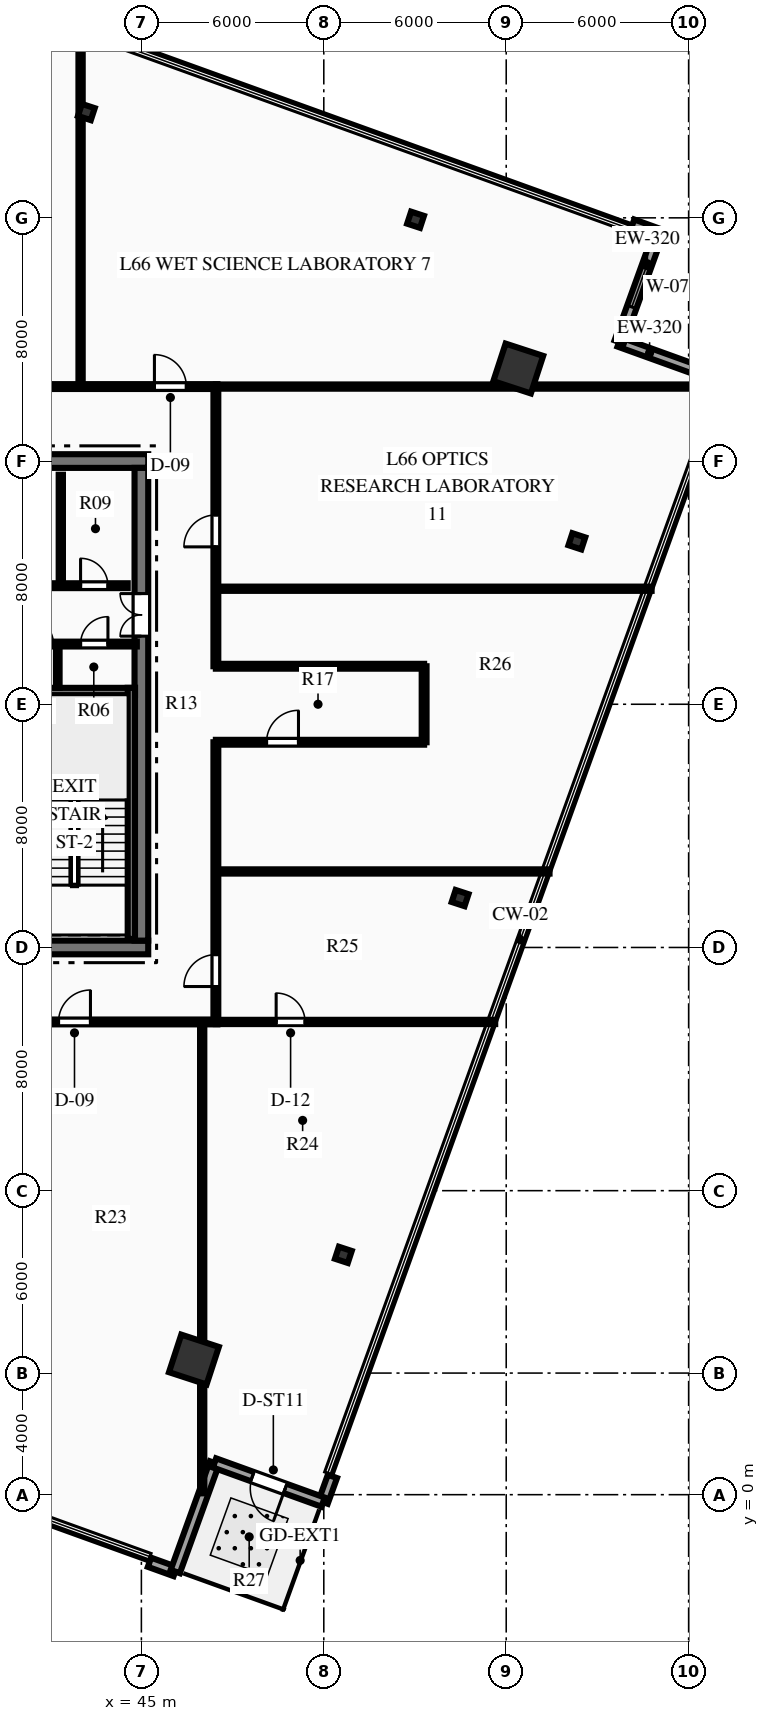
"""IFC4 building model, lengths in metres.
Left out: names, types, materials, properties, quantities, classifications, styles, units other than length and angle.
Written with IfcOpenShell. Run it as: python <this file> out.ifc"""

import sys

from ifc_helpers import new_model, si_unit, direction, frame, frame_2d, origin, origin_2d, place, context, subcontext, project, spatial, rectangle, hollow_rectangle, i_section, extrude, element, fill, save


model = new_model("IFC4")
c1 = context("Model", 3, precision=1e-05, world=origin(), true_north=direction((0.0, 1.0)))
c2 = subcontext(c1, "Body", "Model", "MODEL_VIEW")
j1 = project(units=[si_unit("LENGTHUNIT", "METRE"), si_unit("PLANEANGLEUNIT", "RADIAN")], contexts=[c1])
p1 = place(None, origin())
s1 = spatial("IfcSite", under=j1, at=p1, CompositionType="ELEMENT")
p2 = place(p1, origin())
s2 = spatial("IfcBuilding", under=s1, at=p2, CompositionType="ELEMENT")
p3 = place(p2, frame((0.0, 0.0, 263.7)))
s3 = spatial("IfcBuildingStorey", under=s2, at=p3, CompositionType="ELEMENT", Elevation=263.7)
p4 = place(p3, frame((26.775, 18.0, 0.0), z_axis=(0.0, 0.0, 1.0), x_axis=(1.0, 0.0, 0.0)))
e1 = element("IfcWall", 1, at=p4, inside=s3, PredefinedType="SHEAR", context=c2, shape_type="SweptSolid", body=[
    extrude(rectangle(XDim=18.45, YDim=0.45, at=frame_2d((9.225, 0.0))), origin(), (0.0, 0.0, 1.0), 3.75),
])
p5 = place(p4, frame((7.325, 0.0, 0.0)))
e2 = element("IfcOpeningElement", 2, at=p5, cuts=e1, PredefinedType="OPENING", context=c2, shape_type="SweptSolid", body=[
    extrude(rectangle(XDim=1.1, YDim=2.15, at=frame_2d((0.55, 1.075))), frame((0.0, 0.235, 0.0), z_axis=(0.0, -1.0, 0.0), x_axis=(1.0, 0.0, 0.0)), (0.0, 0.0, 1.0), 0.47),
])
p6 = place(p4, frame((10.025, 0.0, 0.0)))
e3 = element("IfcOpeningElement", 3, at=p6, cuts=e1, PredefinedType="OPENING", context=c2, shape_type="SweptSolid", body=[
    extrude(rectangle(XDim=1.1, YDim=2.15, at=frame_2d((0.55, 1.075))), frame((0.0, 0.235, 0.0), z_axis=(0.0, -1.0, 0.0), x_axis=(1.0, 0.0, 0.0)), (0.0, 0.0, 1.0), 0.47),
])
p7 = place(p3, frame((26.775, 34.0, 0.0), z_axis=(0.0, 0.0, 1.0), x_axis=(1.0, 0.0, 0.0)))
e4 = element("IfcWall", 4, at=p7, inside=s3, PredefinedType="SHEAR", context=c2, shape_type="SweptSolid", body=[
    extrude(rectangle(XDim=18.45, YDim=0.45, at=frame_2d((9.225, 0.0))), origin(), (0.0, 0.0, 1.0), 3.75),
])
p8 = place(p3, frame((45.0, 18.225, 0.0), z_axis=(0.0, 0.0, 1.0), x_axis=(0.0, 1.0, 0.0)))
e5 = element("IfcWall", 5, at=p8, inside=s3, PredefinedType="SHEAR", context=c2, shape_type="SweptSolid", body=[
    extrude(rectangle(XDim=15.55, YDim=0.45, at=frame_2d((7.775, 0.0))), origin(), (0.0, 0.0, 1.0), 3.75),
])
p9 = place(p8, frame((10.015, 0.0, 0.0)))
e6 = element("IfcOpeningElement", 6, at=p9, cuts=e5, PredefinedType="OPENING", context=c2, shape_type="SweptSolid", body=[
    extrude(rectangle(XDim=1.4, YDim=2.2, at=frame_2d((0.7, 1.1))), frame((0.0, 0.235, 0.0), z_axis=(0.0, -1.0, 0.0), x_axis=(1.0, 0.0, 0.0)), (0.0, 0.0, 1.0), 0.47),
])
p10 = place(p3, frame((40.81, 26.42, 0.0), z_axis=(0.0, 0.0, 1.0), x_axis=(1.0, 0.0, 0.0)))
e7 = element("IfcWall", 7, at=p10, inside=s3, PredefinedType="SHEAR", context=c2, shape_type="SweptSolid", body=[
    extrude(rectangle(XDim=3.98, YDim=0.24, at=frame_2d((1.99, 0.0))), origin(), (0.0, 0.0, 1.0), 3.75),
])
p11 = place(p3, frame((44.67, 18.28, 0.0), z_axis=(0.0, 0.0, 1.0), x_axis=(0.0, 1.0, 0.0)))
e8 = element("IfcWall", 8, at=p11, inside=s3, PredefinedType="SHEAR", context=c2, shape_type="SweptSolid", body=[
    extrude(rectangle(XDim=8.26, YDim=0.24, at=frame_2d((4.13, 0.0))), origin(), (0.0, 0.0, 1.0), 3.75),
])
for number, where, z_axis, x_axis in (
    (9, (46.728, 4.445, 0.0), (0.0, 0.0, 1.0), (0.311, 0.95, 0.0)),
    (10, (57.396, 37.043, 0.0), (0.0, 0.0, 1.0), (0.311, 0.95, 0.0)),
):
    element("IfcColumn", number, at=place(p3, frame(where, z_axis=z_axis, x_axis=x_axis)), inside=s3, PredefinedType="COLUMN", context=c2, shape_type="SweptSolid", body=[
        extrude(hollow_rectangle(XDim=1.3, YDim=1.3, WallThickness=0.06, at=origin_2d()), origin(), (0.0, 0.0, 1.0), 3.75),
    ])
for number, where, z_axis, x_axis in (
    (11, (51.643, 7.889, 0.0), (0.0, 0.0, 1.0), (0.311, 0.95, 0.0)),
    (12, (55.483, 19.624, 0.0), (0.0, 0.0, 1.0), (0.311, 0.95, 0.0)),
    (13, (59.324, 31.36, 0.0), (0.0, 0.0, 1.0), (0.311, 0.95, 0.0)),
    (14, (54.018, 41.937, 0.0), (0.0, 0.0, 1.0), (0.311, 0.95, 0.0)),
    (15, (43.19, 45.48, 0.0), (0.0, 0.0, 1.0), (0.311, 0.95, 0.0)),
):
    element("IfcColumn", number, at=place(p3, frame(where, z_axis=z_axis, x_axis=x_axis)), inside=s3, PredefinedType="COLUMN", context=c2, shape_type="SweptSolid", body=[
        extrude(i_section(OverallWidth=0.416, OverallDepth=0.445, WebThickness=0.039, FlangeThickness=0.063, at=origin_2d()), origin(), (0.0, 0.0, 1.0), 3.75),
    ])
p12 = place(p3, frame((51.284, 0.601, 0.0), z_axis=(0.0, 0.0, 1.0), x_axis=(-0.339564485744, -0.940582776805, 0.0)))
e16 = element("IfcWall", 16, at=p12, inside=s3, PredefinedType="STANDARD", context=c2, shape_type="SweptSolid", body=[
    extrude(rectangle(XDim=0.9, YDim=0.32, at=frame_2d((0.45, 0.0))), origin(), (0.0, 0.0, 1.0), 3.48),
])
p13 = place(p3, frame((60.715, 37.916, 0.0), z_axis=(0.0, 0.0, 1.0), x_axis=(0.940567581442, -0.339606573463, 0.0)))
e17 = element("IfcWall", 17, at=p13, inside=s3, PredefinedType="STANDARD", context=c2, shape_type="SweptSolid", body=[
    extrude(rectangle(XDim=3.8, YDim=0.32, at=frame_2d((1.9, 0.0))), origin(), (0.0, 0.0, 1.0), 3.48),
])
p14 = place(p3, frame((62.005, 41.49, 0.0), z_axis=(0.0, 0.0, 1.0), x_axis=(-0.339549734892, -0.940588101953, 0.0)))
e18 = element("IfcWall", 18, at=p14, inside=s3, PredefinedType="STANDARD", context=c2, shape_type="SweptSolid", body=[
    extrude(rectangle(XDim=3.8, YDim=0.32, at=frame_2d((1.9, 0.0))), origin(), (0.0, 0.0, 1.0), 3.48),
])
p15 = place(p14, frame((1.225, 0.0, 0.85)))
e19 = element("IfcOpeningElement", 19, at=p15, cuts=e18, PredefinedType="OPENING", context=c2, shape_type="SweptSolid", body=[
    extrude(rectangle(XDim=1.35, YDim=1.95, at=frame_2d((0.675, 0.975))), frame((0.0, 0.17, 0.0), z_axis=(0.0, -1.0, 0.0), x_axis=(1.0, 0.0, 0.0)), (0.0, 0.0, 1.0), 0.34),
])
for number, where, z_axis, x_axis in (
    (20, (61.158, 41.796, 0.0), (0.0, 0.0, 1.0), (0.941, -0.34, 0.0)),
    (21, (46.114, -2.529, 0.0), (0.0, 0.0, 1.0), (-0.941, 0.34, 0.0)),
):
    element("IfcWall", number, at=place(p3, frame(where, z_axis=z_axis, x_axis=x_axis)), inside=s3, PredefinedType="STANDARD", context=c2, shape_type="SweptSolid", body=[
        extrude(rectangle(XDim=0.9, YDim=0.32, at=frame_2d((0.45, 0.0))), origin(), (0.0, 0.0, 1.0), 3.48),
    ])
p16 = place(p3, frame((47.404, 1.045, 0.0), z_axis=(0.0, 0.0, 1.0), x_axis=(-0.339549734892, -0.940588101953, 0.0)))
e22 = element("IfcWall", 22, at=p16, inside=s3, PredefinedType="STANDARD", context=c2, shape_type="SweptSolid", body=[
    extrude(rectangle(XDim=3.8, YDim=0.32, at=frame_2d((1.9, 0.0))), origin(), (0.0, 0.0, 1.0), 3.48),
])
p17 = place(p3, frame((50.978, -0.245, 0.0), z_axis=(0.0, 0.0, 1.0), x_axis=(-0.940588101953, 0.339549734892, 0.0)))
e23 = element("IfcWall", 23, at=p17, inside=s3, PredefinedType="STANDARD", context=c2, shape_type="SweptSolid", body=[
    extrude(rectangle(XDim=3.8, YDim=0.32, at=frame_2d((1.9, 0.0))), origin(), (0.0, 0.0, 1.0), 3.48),
])
p18 = place(p17, frame((1.325, 0.0, 0.0)))
e24 = element("IfcOpeningElement", 24, at=p18, cuts=e23, PredefinedType="OPENING", context=c2, shape_type="SweptSolid", body=[
    extrude(rectangle(XDim=1.15, YDim=2.2, at=frame_2d((0.575, 1.1))), frame((0.0, 0.17, 0.0), z_axis=(0.0, -1.0, 0.0), x_axis=(1.0, 0.0, 0.0)), (0.0, 0.0, 1.0), 0.34),
])
p19 = place(p3, frame((40.8, 27.98, 0.0), z_axis=(0.0, 0.0, 1.0), x_axis=(1.0, 0.0, 0.0)))
e25 = element("IfcWall", 25, at=p19, inside=s3, PredefinedType="PARTITIONING", context=c2, shape_type="SweptSolid", body=[
    extrude(rectangle(XDim=4.05, YDim=0.16, at=frame_2d((2.025, 0.0))), origin(), (0.0, 0.0, 1.0), 3.48),
])
p20 = place(p19, frame((0.407, 0.0, 0.0)))
e26 = element("IfcOpeningElement", 26, at=p20, cuts=e25, PredefinedType="OPENING", context=c2, shape_type="SweptSolid", body=[
    extrude(rectangle(XDim=0.9, YDim=2.15, at=frame_2d((0.45, 1.075))), frame((0.0, 0.09, 0.0), z_axis=(0.0, -1.0, 0.0), x_axis=(1.0, 0.0, 0.0)), (0.0, 0.0, 1.0), 0.18),
])
p21 = place(p19, frame((2.2, 0.0, 0.0)))
e27 = element("IfcOpeningElement", 27, at=p21, cuts=e25, PredefinedType="OPENING", context=c2, shape_type="SweptSolid", body=[
    extrude(rectangle(XDim=0.9, YDim=2.15, at=frame_2d((0.45, 1.075))), frame((0.0, 0.09, 0.0), z_axis=(0.0, -1.0, 0.0), x_axis=(1.0, 0.0, 0.0)), (0.0, 0.0, 1.0), 0.18),
])
p22 = place(p3, frame((42.25, 26.54, 0.0), z_axis=(0.0, 0.0, 1.0), x_axis=(0.0, 1.0, 0.0)))
e28 = element("IfcWall", 28, at=p22, inside=s3, PredefinedType="PARTITIONING", context=c2, shape_type="SweptSolid", body=[
    extrude(rectangle(XDim=1.44, YDim=0.12, at=frame_2d((0.72, 0.0))), origin(), (0.0, 0.0, 1.0), 3.48),
])
p23 = place(p3, frame((40.12, 29.9, 0.0), z_axis=(0.0, 0.0, 1.0), x_axis=(1.0, 0.0, 0.0)))
e29 = element("IfcWall", 29, at=p23, inside=s3, PredefinedType="PARTITIONING", context=c2, shape_type="SweptSolid", body=[
    extrude(rectangle(XDim=4.43, YDim=0.16, at=frame_2d((2.215, 0.0))), origin(), (0.0, 0.0, 1.0), 3.48),
])
p24 = place(p23, frame((0.63, 0.0, 0.0)))
e30 = element("IfcOpeningElement", 30, at=p24, cuts=e29, PredefinedType="OPENING", context=c2, shape_type="SweptSolid", body=[
    extrude(rectangle(XDim=0.9, YDim=2.15, at=frame_2d((0.45, 1.075))), frame((0.0, 0.09, 0.0), z_axis=(0.0, -1.0, 0.0), x_axis=(1.0, 0.0, 0.0)), (0.0, 0.0, 1.0), 0.18),
])
p25 = place(p23, frame((2.88, 0.0, 0.0)))
e31 = element("IfcOpeningElement", 31, at=p25, cuts=e29, PredefinedType="OPENING", context=c2, shape_type="SweptSolid", body=[
    extrude(rectangle(XDim=0.9, YDim=2.15, at=frame_2d((0.45, 1.075))), frame((0.0, 0.09, 0.0), z_axis=(0.0, -1.0, 0.0), x_axis=(1.0, 0.0, 0.0)), (0.0, 0.0, 1.0), 0.18),
])
p26 = place(p3, frame((42.35, 29.95, 0.0), z_axis=(0.0, 0.0, 1.0), x_axis=(0.0, 1.0, 0.0)))
e32 = element("IfcWall", 32, at=p26, inside=s3, PredefinedType="PARTITIONING", context=c2, shape_type="SweptSolid", body=[
    extrude(rectangle(XDim=3.6, YDim=0.14, at=frame_2d((1.8, 0.0))), origin(), (0.0, 0.0, 1.0), 3.48),
])
p27 = place(p3, frame((37.25, 15.55, 0.0), z_axis=(0.0, 0.0, 1.0), x_axis=(1.0, 0.0, 0.0)))
e33 = element("IfcWall", 33, at=p27, inside=s3, PredefinedType="PARTITIONING", context=c2, shape_type="SweptSolid", body=[
    extrude(rectangle(XDim=10.25, YDim=0.16, at=frame_2d((5.125, 0.0))), origin(), (0.0, 0.0, 1.0), 3.48),
])
p28 = place(p27, frame((5.025, 0.0, 0.0)))
e34 = element("IfcOpeningElement", 34, at=p28, cuts=e33, PredefinedType="OPENING", context=c2, shape_type="SweptSolid", body=[
    extrude(rectangle(XDim=1.05, YDim=2.15, at=frame_2d((0.525, 1.075))), frame((0.0, 0.09, 0.0), z_axis=(0.0, -1.0, 0.0), x_axis=(1.0, 0.0, 0.0)), (0.0, 0.0, 1.0), 0.18),
])
p29 = place(p3, frame((37.25, 36.45, 0.0), z_axis=(0.0, 0.0, 1.0), x_axis=(1.0, 0.0, 0.0)))
e35 = element("IfcWall", 35, at=p29, inside=s3, PredefinedType="PARTITIONING", context=c2, shape_type="SweptSolid", body=[
    extrude(rectangle(XDim=10.25, YDim=0.16, at=frame_2d((5.125, 0.0))), origin(), (0.0, 0.0, 1.0), 3.48),
])
p30 = place(p29, frame((8.179, 0.0, 0.0)))
e36 = element("IfcOpeningElement", 36, at=p30, cuts=e35, PredefinedType="OPENING", context=c2, shape_type="SweptSolid", body=[
    extrude(rectangle(XDim=1.05, YDim=2.15, at=frame_2d((0.525, 1.075))), frame((0.0, 0.09, 0.0), z_axis=(0.0, -1.0, 0.0), x_axis=(1.0, 0.0, 0.0)), (0.0, 0.0, 1.0), 0.18),
])
p31 = place(p3, frame((47.45, 15.55, 0.0), z_axis=(0.0, 0.0, 1.0), x_axis=(0.0, 1.0, 0.0)))
e37 = element("IfcWall", 37, at=p31, inside=s3, PredefinedType="PARTITIONING", context=c2, shape_type="SweptSolid", body=[
    extrude(rectangle(XDim=9.2, YDim=0.16, at=frame_2d((4.6, 0.0))), origin(), (0.0, 0.0, 1.0), 3.48),
])
p32 = place(p31, frame((1.165, 0.0, 0.0)))
e38 = element("IfcOpeningElement", 38, at=p32, cuts=e37, PredefinedType="OPENING", context=c2, shape_type="SweptSolid", body=[
    extrude(rectangle(XDim=1.05, YDim=2.15, at=frame_2d((0.525, 1.075))), frame((0.0, 0.09, 0.0), z_axis=(0.0, -1.0, 0.0), x_axis=(1.0, 0.0, 0.0)), (0.0, 0.0, 1.0), 0.18),
])
p33 = place(p3, frame((47.45, 27.25, 0.0), z_axis=(0.0, 0.0, 1.0), x_axis=(0.0, 1.0, 0.0)))
e39 = element("IfcWall", 39, at=p33, inside=s3, PredefinedType="PARTITIONING", context=c2, shape_type="SweptSolid", body=[
    extrude(rectangle(XDim=9.2, YDim=0.16, at=frame_2d((4.6, 0.0))), origin(), (0.0, 0.0, 1.0), 3.48),
])
p34 = place(p33, frame((3.927, 0.0, 0.0)))
e40 = element("IfcOpeningElement", 40, at=p34, cuts=e39, PredefinedType="OPENING", context=c2, shape_type="SweptSolid", body=[
    extrude(rectangle(XDim=1.05, YDim=2.15, at=frame_2d((0.525, 1.075))), frame((0.0, 0.09, 0.0), z_axis=(0.0, -1.0, 0.0), x_axis=(1.0, 0.0, 0.0)), (0.0, 0.0, 1.0), 0.18),
])
p35 = place(p3, frame((47.45, 24.75, 0.0), z_axis=(0.0, 0.0, 1.0), x_axis=(1.0, 0.0, 0.0)))
e41 = element("IfcWall", 41, at=p35, inside=s3, PredefinedType="PARTITIONING", context=c2, shape_type="SweptSolid", body=[
    extrude(rectangle(XDim=6.85, YDim=0.16, at=frame_2d((3.425, 0.0))), origin(), (0.0, 0.0, 1.0), 3.48),
])
p36 = place(p35, frame((1.667, 0.0, 0.0)))
e42 = element("IfcOpeningElement", 42, at=p36, cuts=e41, PredefinedType="OPENING", context=c2, shape_type="SweptSolid", body=[
    extrude(rectangle(XDim=1.05, YDim=2.15, at=frame_2d((0.525, 1.075))), frame((0.0, 0.09, 0.0), z_axis=(0.0, -1.0, 0.0), x_axis=(1.0, 0.0, 0.0)), (0.0, 0.0, 1.0), 0.18),
])
p37 = place(p3, frame((47.45, 27.25, 0.0), z_axis=(0.0, 0.0, 1.0), x_axis=(1.0, 0.0, 0.0)))
e43 = element("IfcWall", 43, at=p37, inside=s3, PredefinedType="PARTITIONING", context=c2, shape_type="SweptSolid", body=[
    extrude(rectangle(XDim=6.85, YDim=0.16, at=frame_2d((3.425, 0.0))), origin(), (0.0, 0.0, 1.0), 3.48),
])
p38 = place(p3, frame((54.3, 24.75, 0.0), z_axis=(0.0, 0.0, 1.0), x_axis=(0.0, 1.0, 0.0)))
e44 = element("IfcWall", 44, at=p38, inside=s3, PredefinedType="PARTITIONING", context=c2, shape_type="SweptSolid", body=[
    extrude(rectangle(XDim=2.5, YDim=0.16, at=frame_2d((1.25, 0.0))), origin(), (0.0, 0.0, 1.0), 3.48),
])
p39 = place(p3, frame((47.45, 15.55, 0.0), z_axis=(0.0, 0.0, 1.0), x_axis=(1.0, 0.0, 0.0)))
e45 = element("IfcWall", 45, at=p39, inside=s3, PredefinedType="PARTITIONING", context=c2, shape_type="SweptSolid", body=[
    extrude(rectangle(XDim=9.188, YDim=0.14, at=frame_2d((4.594, 0.0))), origin(), (0.0, 0.0, 1.0), 3.48),
])
p40 = place(p39, frame((1.983, 0.0, 0.0)))
e46 = element("IfcOpeningElement", 46, at=p40, cuts=e45, PredefinedType="OPENING", context=c2, shape_type="SweptSolid", body=[
    extrude(rectangle(XDim=0.95, YDim=2.15, at=frame_2d((0.475, 1.075))), frame((0.0, 0.08, 0.0), z_axis=(0.0, -1.0, 0.0), x_axis=(1.0, 0.0, 0.0)), (0.0, 0.0, 1.0), 0.16),
])
p41 = place(p3, frame((47.45, 36.45, 0.0), z_axis=(0.0, 0.0, 1.0), x_axis=(1.0, 0.0, 0.0)))
e47 = element("IfcWall", 47, at=p41, inside=s3, PredefinedType="PARTITIONING", context=c2, shape_type="SweptSolid", body=[
    extrude(rectangle(XDim=16.733, YDim=0.14, at=frame_2d((8.366, 0.0))), origin(), (0.0, 0.0, 1.0), 2.858),
])
p42 = place(p3, frame((47.0, 0.044, 0.0), z_axis=(0.0, 0.0, 1.0), x_axis=(0.0, 1.0, 0.0)))
e48 = element("IfcWall", 48, at=p42, inside=s3, PredefinedType="PARTITIONING", context=c2, shape_type="SweptSolid", body=[
    extrude(rectangle(XDim=15.506, YDim=0.14, at=frame_2d((7.753, 0.0))), origin(), (0.0, 0.0, 1.0), 3.48),
])
p43 = place(p3, frame((43.0, 36.45, 0.0), z_axis=(0.0, 0.0, 1.0), x_axis=(0.0, 1.0, 0.0)))
e49 = element("IfcWall", 49, at=p43, inside=s3, PredefinedType="PARTITIONING", context=c2, shape_type="SweptSolid", body=[
    extrude(rectangle(XDim=11.859, YDim=0.14, at=frame_2d((5.929, 0.0))), origin(), (0.0, 0.0, 1.0), 2.858),
])
p44 = place(p3, frame((47.45, 20.5, 0.0), z_axis=(0.0, 0.0, 1.0), x_axis=(1.0, 0.0, 0.0)))
e50 = element("IfcWall", 50, at=p44, inside=s3, PredefinedType="PARTITIONING", context=c2, shape_type="SweptSolid", body=[
    extrude(rectangle(XDim=10.975, YDim=0.14, at=frame_2d((5.487, 0.0))), origin(), (0.0, 0.0, 1.0), 3.48),
])
p45 = place(p3, frame((47.45, 29.8, 0.0), z_axis=(0.0, 0.0, 1.0), x_axis=(1.0, 0.0, 0.0)))
e51 = element("IfcWall", 51, at=p45, inside=s3, PredefinedType="PARTITIONING", context=c2, shape_type="SweptSolid", body=[
    extrude(rectangle(XDim=14.332, YDim=0.14, at=frame_2d((7.166, 0.0))), origin(), (0.0, 0.0, 1.0), 3.48),
])
p46 = place(p15, origin())
e52 = element("IfcWindow", 52, at=p46, inside=s3, PartitioningType="SINGLE_PANEL", PredefinedType="WINDOW", context=c2, shape_type="SweptSolid", body=[
    extrude(rectangle(XDim=1.35, YDim=1.95, at=frame_2d((0.675, 0.975))), frame((0.0, 0.03, 0.0), z_axis=(0.0, -1.0, 0.0), x_axis=(1.0, 0.0, 0.0)), (0.0, 0.0, 1.0), 0.06),
])
fill(e19, e52)
p47 = place(p18, origin())
e53 = element("IfcDoor", 53, at=p47, inside=s3, OperationType="SINGLE_SWING_LEFT", PredefinedType="DOOR", context=c2, shape_type="SweptSolid", body=[
    extrude(rectangle(XDim=1.15, YDim=2.2, at=frame_2d((0.575, 1.1))), frame((0.0, 0.025, 0.0), z_axis=(0.0, -1.0, 0.0), x_axis=(1.0, 0.0, 0.0)), (0.0, 0.0, 1.0), 0.05),
])
fill(e24, e53)
p48 = place(p20, origin())
e54 = element("IfcDoor", 54, at=p48, inside=s3, OperationType="SINGLE_SWING_LEFT", PredefinedType="DOOR", context=c2, shape_type="SweptSolid", body=[
    extrude(rectangle(XDim=0.9, YDim=2.15, at=frame_2d((0.45, 1.075))), frame((0.0, 0.025, 0.0), z_axis=(0.0, -1.0, 0.0), x_axis=(1.0, 0.0, 0.0)), (0.0, 0.0, 1.0), 0.05),
])
fill(e26, e54)
p49 = place(p21, origin())
e55 = element("IfcDoor", 55, at=p49, inside=s3, OperationType="SINGLE_SWING_RIGHT", PredefinedType="DOOR", context=c2, shape_type="SweptSolid", body=[
    extrude(rectangle(XDim=0.9, YDim=2.15, at=frame_2d((0.45, 1.075))), frame((0.0, 0.025, 0.0), z_axis=(0.0, -1.0, 0.0), x_axis=(1.0, 0.0, 0.0)), (0.0, 0.0, 1.0), 0.05),
])
fill(e27, e55)
p50 = place(p25, origin())
e56 = element("IfcDoor", 56, at=p50, inside=s3, OperationType="SINGLE_SWING_LEFT", PredefinedType="DOOR", context=c2, shape_type="SweptSolid", body=[
    extrude(rectangle(XDim=0.9, YDim=2.15, at=frame_2d((0.45, 1.075))), frame((0.0, 0.025, 0.0), z_axis=(0.0, -1.0, 0.0), x_axis=(1.0, 0.0, 0.0)), (0.0, 0.0, 1.0), 0.05),
])
fill(e31, e56)
p51 = place(p9, origin())
e57 = element("IfcDoor", 57, at=p51, inside=s3, OperationType="DOUBLE_DOOR_SINGLE_SWING", PredefinedType="DOOR", context=c2, shape_type="SweptSolid", body=[
    extrude(rectangle(XDim=1.4, YDim=2.2, at=frame_2d((0.7, 1.1))), frame((0.0, 0.025, 0.0), z_axis=(0.0, -1.0, 0.0), x_axis=(1.0, 0.0, 0.0)), (0.0, 0.0, 1.0), 0.05),
])
fill(e6, e57)
p52 = place(p28, origin())
e58 = element("IfcDoor", 58, at=p52, inside=s3, OperationType="SINGLE_SWING_RIGHT", PredefinedType="DOOR", context=c2, shape_type="SweptSolid", body=[
    extrude(rectangle(XDim=1.05, YDim=2.15, at=frame_2d((0.525, 1.075))), frame((0.0, 0.025, 0.0), z_axis=(0.0, -1.0, 0.0), x_axis=(1.0, 0.0, 0.0)), (0.0, 0.0, 1.0), 0.05),
])
fill(e34, e58)
p53 = place(p40, origin())
e59 = element("IfcDoor", 59, at=p53, inside=s3, OperationType="SINGLE_SWING_LEFT", PredefinedType="DOOR", context=c2, shape_type="SweptSolid", body=[
    extrude(rectangle(XDim=0.95, YDim=2.15, at=frame_2d((0.475, 1.075))), frame((0.0, 0.025, 0.0), z_axis=(0.0, -1.0, 0.0), x_axis=(1.0, 0.0, 0.0)), (0.0, 0.0, 1.0), 0.05),
])
fill(e46, e59)
p54 = place(p30, origin())
e60 = element("IfcDoor", 60, at=p54, inside=s3, OperationType="SINGLE_SWING_LEFT", PredefinedType="DOOR", context=c2, shape_type="SweptSolid", body=[
    extrude(rectangle(XDim=1.05, YDim=2.15, at=frame_2d((0.525, 1.075))), frame((0.0, 0.025, 0.0), z_axis=(0.0, -1.0, 0.0), x_axis=(1.0, 0.0, 0.0)), (0.0, 0.0, 1.0), 0.05),
])
fill(e36, e60)
p55 = place(p32, origin())
e61 = element("IfcDoor", 61, at=p55, inside=s3, OperationType="SINGLE_SWING_LEFT", PredefinedType="DOOR", context=c2, shape_type="SweptSolid", body=[
    extrude(rectangle(XDim=1.05, YDim=2.15, at=frame_2d((0.525, 1.075))), frame((0.0, 0.025, 0.0), z_axis=(0.0, -1.0, 0.0), x_axis=(1.0, 0.0, 0.0)), (0.0, 0.0, 1.0), 0.05),
])
fill(e38, e61)
p56 = place(p36, origin())
e62 = element("IfcDoor", 62, at=p56, inside=s3, OperationType="SINGLE_SWING_RIGHT", PredefinedType="DOOR", context=c2, shape_type="SweptSolid", body=[
    extrude(rectangle(XDim=1.05, YDim=2.15, at=frame_2d((0.525, 1.075))), frame((0.0, 0.025, 0.0), z_axis=(0.0, -1.0, 0.0), x_axis=(1.0, 0.0, 0.0)), (0.0, 0.0, 1.0), 0.05),
])
fill(e42, e62)
p57 = place(p34, origin())
e63 = element("IfcDoor", 63, at=p57, inside=s3, OperationType="SINGLE_SWING_LEFT", PredefinedType="DOOR", context=c2, shape_type="SweptSolid", body=[
    extrude(rectangle(XDim=1.05, YDim=2.15, at=frame_2d((0.525, 1.075))), frame((0.0, 0.025, 0.0), z_axis=(0.0, -1.0, 0.0), x_axis=(1.0, 0.0, 0.0)), (0.0, 0.0, 1.0), 0.05),
])
fill(e40, e63)
save(model, sys.argv[1])
